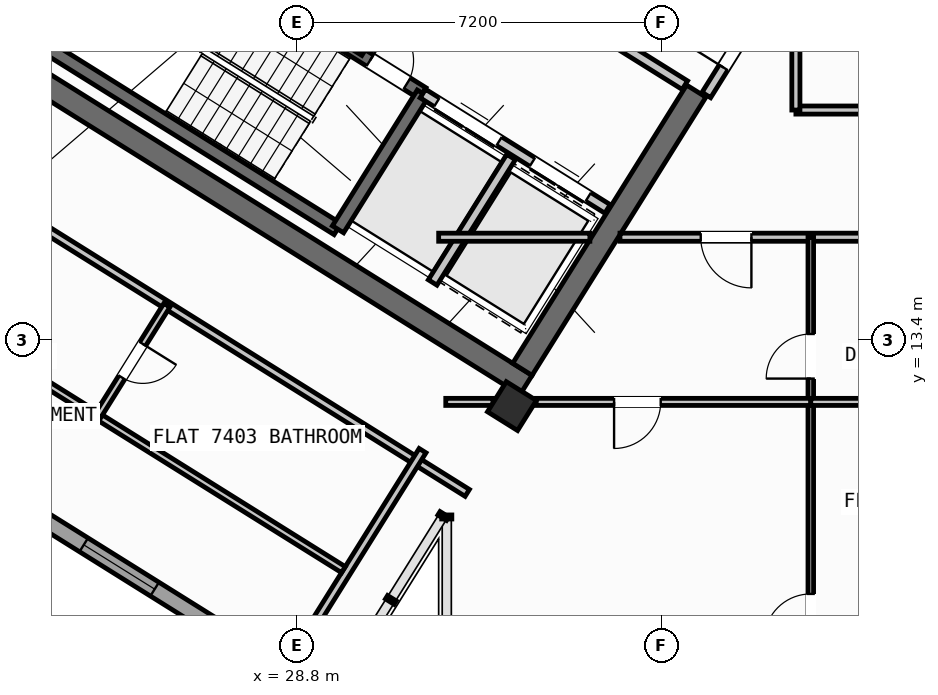
"""IFC4 building model, lengths in metres.
Left out: names, types, materials, properties, quantities, classifications, styles, units other than length and angle.
Written with IfcOpenShell. Run it as: python <this file> out.ifc"""

import sys

from ifc_helpers import new_model, si_unit, direction, frame, frame_2d, origin, origin_2d, place, context, subcontext, project, spatial, rectangle, hollow_rectangle, extrude, source, transform, mapped, element, fill, save


model = new_model("IFC4")
c1 = context("Model", 3, precision=1e-05, world=origin(), true_north=direction((0.0, 1.0)))
c2 = subcontext(c1, "Body", "Model", "MODEL_VIEW")
j1 = project(units=[si_unit("LENGTHUNIT", "METRE"), si_unit("PLANEANGLEUNIT", "RADIAN")], contexts=[c1])
p1 = place(None, origin())
s1 = spatial("IfcSite", under=j1, at=p1, CompositionType="ELEMENT")
p2 = place(p1, origin())
s2 = spatial("IfcBuilding", under=s1, at=p2, CompositionType="ELEMENT")
p3 = place(p2, frame((0.0, 0.0, 291.6)))
s3 = spatial("IfcBuildingStorey", under=s2, at=p3, CompositionType="ELEMENT", Elevation=291.6)
p4 = place(p3, frame((33.324, 12.503, 0.0), z_axis=(0.0, 0.0, 1.0), x_axis=(-0.848043529849, 0.529926571782, 0.0)))
e1 = element("IfcWall", 1, at=p4, inside=s3, PredefinedType="SHEAR", context=c2, shape_type="SweptSolid", body=[
    extrude(rectangle(XDim=13.04, YDim=0.45, at=frame_2d((6.52, 0.0))), origin(), (0.0, 0.0, 1.0), 3.35),
])
p5 = place(p3, frame((36.683, 18.304, 0.0), z_axis=(0.0, 0.0, 1.0), x_axis=(-0.529904039071, -0.848057609704, 0.0)))
e2 = element("IfcWall", 2, at=p5, inside=s3, PredefinedType="SHEAR", context=c2, shape_type="SweptSolid", body=[
    extrude(rectangle(XDim=6.475, YDim=0.45, at=frame_2d((3.238, 0.0))), origin(), (0.0, 0.0, 1.0), 3.35),
])
m1 = source(origin(), c2, "Body", "SweptSolid", [
    extrude(hollow_rectangle(XDim=0.7, YDim=0.7, WallThickness=0.028, at=origin_2d()), origin(), (0.0, 0.0, 1.0), 3.6),
])
p6 = place(p3, frame((33.046, 12.087, 0.0), z_axis=(0.0, 0.0, 1.0), x_axis=(-0.848048096156, 0.529919264233, 0.0)))
e3 = element("IfcColumn", 3, at=p6, inside=s3, PredefinedType="COLUMN", context=c2, shape_type="MappedRepresentation", body=[
    mapped(m1, transform((0.0, 0.0, 0.0), scale=1.0)),
])
p7 = place(p3, frame((29.268, 6.429, 0.0), z_axis=(0.0, 0.0, 1.0), x_axis=(-0.848048398186, 0.529918780885, 0.0)))
e4 = element("IfcWall", 4, at=p7, inside=s3, PredefinedType="STANDARD", context=c2, shape_type="SweptSolid", body=[
    extrude(rectangle(XDim=25.188, YDim=0.32, at=frame_2d((12.594, 0.0))), origin(), (0.0, 0.0, 1.0), 3.35),
])
p8 = place(p7, frame((16.362, 0.0, 0.0)))
e5 = element("IfcOpeningElement", 5, at=p8, cuts=e4, PredefinedType="OPENING", context=c2, shape_type="SweptSolid", body=[
    extrude(rectangle(XDim=1.2, YDim=2.15, at=frame_2d((0.6, 1.075))), frame((0.0, 0.17, 0.0), z_axis=(0.0, -1.0, 0.0), x_axis=(1.0, 0.0, 0.0)), (0.0, 0.0, 1.0), 0.34),
])
p9 = place(p7, frame((3.859, 0.0, 0.9)))
e6 = element("IfcOpeningElement", 6, at=p9, cuts=e4, PredefinedType="OPENING", context=c2, shape_type="SweptSolid", body=[
    extrude(rectangle(XDim=1.65, YDim=1.45, at=frame_2d((0.825, 0.725))), frame((0.0, 0.17, 0.0), z_axis=(0.0, -1.0, 0.0), x_axis=(1.0, 0.0, 0.0)), (0.0, 0.0, 1.0), 0.34),
])
p10 = place(p7, frame((10.519, 0.0, 0.9)))
e7 = element("IfcOpeningElement", 7, at=p10, cuts=e4, PredefinedType="OPENING", context=c2, shape_type="SweptSolid", body=[
    extrude(rectangle(XDim=1.65, YDim=1.45, at=frame_2d((0.825, 0.725))), frame((0.0, 0.17, 0.0), z_axis=(0.0, -1.0, 0.0), x_axis=(1.0, 0.0, 0.0)), (0.0, 0.0, 1.0), 0.34),
])
p11 = place(p7, frame((21.156, 0.0, 0.95)))
e8 = element("IfcOpeningElement", 8, at=p11, cuts=e4, PredefinedType="OPENING", context=c2, shape_type="SweptSolid", body=[
    extrude(rectangle(XDim=1.95, YDim=1.35, at=frame_2d((0.975, 0.675))), frame((0.0, 0.17, 0.0), z_axis=(0.0, -1.0, 0.0), x_axis=(1.0, 0.0, 0.0)), (0.0, 0.0, 1.0), 0.34),
])
p12 = place(p3, frame((29.605, 15.581, 0.0), z_axis=(0.0, 0.0, 1.0), x_axis=(-0.848036911448, 0.529937163087, 0.0)))
e9 = element("IfcWall", 9, at=p12, inside=s3, PredefinedType="SHEAR", context=c2, shape_type="SweptSolid", body=[
    extrude(rectangle(XDim=7.46, YDim=0.26, at=frame_2d((3.73, 0.0))), origin(), (0.0, 0.0, 1.0), 3.35),
])
p13 = place(p3, frame((31.28, 18.261, 0.0), z_axis=(0.0, 0.0, 1.0), x_axis=(-0.848051618787, 0.529913626805, 0.0)))
e10 = element("IfcWall", 10, at=p13, inside=s3, PredefinedType="SHEAR", context=c2, shape_type="SweptSolid", body=[
    extrude(rectangle(XDim=7.46, YDim=0.26, at=frame_2d((3.73, 0.0))), origin(), (0.0, 0.0, 1.0), 3.35),
])
p14 = place(p13, frame((0.36, 0.0, 0.0)))
e11 = element("IfcOpeningElement", 11, at=p14, cuts=e10, PredefinedType="OPENING", context=c2, shape_type="SweptSolid", body=[
    extrude(rectangle(XDim=0.86, YDim=2.05, at=frame_2d((0.43, 1.025))), frame((0.0, 0.14, 0.0), z_axis=(0.0, -1.0, 0.0), x_axis=(1.0, 0.0, 0.0)), (0.0, 0.0, 1.0), 0.28),
])
p15 = place(p3, frame((31.288, 18.256, 0.0), z_axis=(0.0, 0.0, 1.0), x_axis=(-0.529943379326, -0.848033026897, 0.0)))
e12 = element("IfcWall", 12, at=p15, inside=s3, PredefinedType="SHEAR", context=c2, shape_type="SweptSolid", body=[
    extrude(rectangle(XDim=3.16, YDim=0.26, at=frame_2d((1.58, 0.0))), origin(), (0.0, 0.0, 1.0), 3.35),
])
p16 = place(p3, frame((34.933, 15.978, 0.0), z_axis=(0.0, 0.0, 1.0), x_axis=(-0.848055739377, 0.529907032327, 0.0)))
e13 = element("IfcWall", 13, at=p16, inside=s3, PredefinedType="STANDARD", context=c2, shape_type="SweptSolid", body=[
    extrude(rectangle(XDim=4.298, YDim=0.2, at=frame_2d((2.149, 0.0))), origin(), (0.0, 0.0, 1.0), 3.34),
])
p17 = place(p16, frame((0.448, 0.0, 0.0)))
e14 = element("IfcOpeningElement", 14, at=p17, cuts=e13, PredefinedType="OPENING", context=c2, shape_type="SweptSolid", body=[
    extrude(rectangle(XDim=1.3, YDim=2.2, at=frame_2d((0.65, 1.1))), frame((0.0, 0.11, 0.0), z_axis=(0.0, -1.0, 0.0), x_axis=(1.0, 0.0, 0.0)), (0.0, 0.0, 1.0), 0.22),
])
p18 = place(p16, frame((2.523, 0.0, 0.0)))
e15 = element("IfcOpeningElement", 15, at=p18, cuts=e13, PredefinedType="OPENING", context=c2, shape_type="SweptSolid", body=[
    extrude(rectangle(XDim=1.45, YDim=2.25, at=frame_2d((0.725, 1.125))), frame((0.0, 0.11, 0.0), z_axis=(0.0, -1.0, 0.0), x_axis=(1.0, 0.0, 0.0)), (0.0, 0.0, 1.0), 0.22),
])
p19 = place(p3, frame((36.459, 18.421, 0.0), z_axis=(0.0, 0.0, 1.0), x_axis=(-0.848059591691, 0.529900867089, 0.0)))
e16 = element("IfcWall", 16, at=p19, inside=s3, PredefinedType="STANDARD", context=c2, shape_type="SweptSolid", body=[
    extrude(rectangle(XDim=5.818, YDim=0.2, at=frame_2d((2.909, 0.0))), origin(), (0.0, 0.0, 1.0), 3.34),
])
p20 = place(p19, frame((2.598, 0.0, 0.0)))
e17 = element("IfcOpeningElement", 17, at=p20, cuts=e16, PredefinedType="OPENING", context=c2, shape_type="SweptSolid", body=[
    extrude(rectangle(XDim=1.15, YDim=2.1, at=frame_2d((0.575, 1.05))), frame((0.0, 0.11, 0.0), z_axis=(0.0, -1.0, 0.0), x_axis=(1.0, 0.0, 0.0)), (0.0, 0.0, 1.0), 0.22),
])
p21 = place(p3, frame((33.029, 17.003, 0.0), z_axis=(0.0, 0.0, 1.0), x_axis=(-0.529916267533, -0.848049968695, 0.0)))
e18 = element("IfcWall", 18, at=p21, inside=s3, PredefinedType="STANDARD", context=c2, shape_type="SweptSolid", body=[
    extrude(rectangle(XDim=2.92, YDim=0.2, at=frame_2d((1.46, 0.0))), origin(), (0.0, 0.0, 1.0), 3.34),
])
p22 = place(p3, frame((31.525, 21.504, 0.0), z_axis=(0.0, 0.0, 1.0), x_axis=(-0.529907497854, -0.848055448493, 0.0)))
e19 = element("IfcWall", 19, at=p22, inside=s3, PredefinedType="STANDARD", context=c2, shape_type="SweptSolid", body=[
    extrude(rectangle(XDim=2.88, YDim=0.2, at=frame_2d((1.44, 0.0))), origin(), (0.0, 0.0, 1.0), 3.34),
])
p23 = place(p3, frame((32.164, 10.374, 0.0), z_axis=(0.0, 0.0, 1.0), x_axis=(-0.848044107957, 0.529925646633, 0.0)))
e20 = element("IfcWall", 20, at=p23, inside=s3, PredefinedType="PARTITIONING", context=c2, shape_type="SweptSolid", body=[
    extrude(rectangle(XDim=15.57, YDim=0.16, at=frame_2d((7.785, 0.0))), origin(), (0.0, 0.0, 1.0), 3.34),
])
p24 = place(p23, frame((10.83, 0.0, 0.0)))
e21 = element("IfcOpeningElement", 21, at=p24, cuts=e20, PredefinedType="OPENING", context=c2, shape_type="SweptSolid", body=[
    extrude(rectangle(XDim=1.0, YDim=2.1, at=frame_2d((0.5, 1.05))), frame((0.0, 0.09, 0.0), z_axis=(0.0, -1.0, 0.0), x_axis=(1.0, 0.0, 0.0)), (0.0, 0.0, 1.0), 0.18),
])
p25 = place(p3, frame((31.282, 11.208, 0.0), z_axis=(0.0, 0.0, 1.0), x_axis=(-0.529938869374, -0.84803584519, 0.0)))
e22 = element("IfcWall", 22, at=p25, inside=s3, PredefinedType="PARTITIONING", context=c2, shape_type="SweptSolid", body=[
    extrude(rectangle(XDim=5.48, YDim=0.16, at=frame_2d((2.74, 0.0))), origin(), (0.0, 0.0, 1.0), 3.34),
])
p26 = place(p3, frame((29.72, 8.859, 0.0), z_axis=(0.0, 0.0, 1.0), x_axis=(-0.848049134363, 0.529917602752, 0.0)))
e23 = element("IfcWall", 23, at=p26, inside=s3, PredefinedType="PLUMBINGWALL", context=c2, shape_type="SweptSolid", body=[
    extrude(rectangle(XDim=14.3, YDim=0.14, at=frame_2d((7.15, 0.0))), origin(), (0.0, 0.0, 1.0), 3.34),
])
p27 = place(p26, frame((9.57, 0.0, 0.0)))
e24 = element("IfcOpeningElement", 24, at=p27, cuts=e23, PredefinedType="OPENING", context=c2, shape_type="SweptSolid", body=[
    extrude(rectangle(XDim=0.92, YDim=2.08, at=frame_2d((0.46, 1.04))), frame((0.0, 0.08, 0.0), z_axis=(0.0, -1.0, 0.0), x_axis=(1.0, 0.0, 0.0)), (0.0, 0.0, 1.0), 0.16),
])
p28 = place(p3, frame((26.237, 14.078, 0.0), z_axis=(0.0, 0.0, 1.0), x_axis=(-0.52995640672, -0.848024885824, 0.0)))
e25 = element("IfcWall", 25, at=p28, inside=s3, PredefinedType="PLUMBINGWALL", context=c2, shape_type="SweptSolid", body=[
    extrude(rectangle(XDim=2.58, YDim=0.14, at=frame_2d((1.29, 0.0))), origin(), (0.0, 0.0, 1.0), 3.34),
])
p29 = place(p28, frame((0.9, 0.0, 0.0)))
e26 = element("IfcOpeningElement", 26, at=p29, cuts=e25, PredefinedType="OPENING", context=c2, shape_type="SweptSolid", body=[
    extrude(rectangle(XDim=0.78, YDim=2.05, at=frame_2d((0.39, 1.025))), frame((0.0, 0.08, 0.0), z_axis=(0.0, -1.0, 0.0), x_axis=(1.0, 0.0, 0.0)), (0.0, 0.0, 1.0), 0.16),
])
p30 = place(p3, frame((38.451, 20.737, 0.0), z_axis=(0.0, 0.0, 1.0), x_axis=(-0.529924799939, -0.848044637038, 0.0)))
e27 = element("IfcWall", 27, at=p30, inside=s3, PredefinedType="STANDARD", context=c2, shape_type="SweptSolid", body=[
    extrude(rectangle(XDim=2.96, YDim=0.2, at=frame_2d((1.48, 0.0))), origin(), (0.0, 0.0, 1.0), 3.34),
])
p31 = place(p30, frame((1.46, 0.0, 0.0)))
e28 = element("IfcOpeningElement", 28, at=p31, cuts=e27, PredefinedType="OPENING", context=c2, shape_type="SweptSolid", body=[
    extrude(rectangle(XDim=0.86, YDim=2.05, at=frame_2d((0.43, 1.025))), frame((0.0, 0.11, 0.0), z_axis=(0.0, -1.0, 0.0), x_axis=(1.0, 0.0, 0.0)), (0.0, 0.0, 1.0), 0.22),
])
p32 = place(p3, frame((31.6, 15.42, 0.0), z_axis=(0.0, 0.0, 1.0), x_axis=(1.0, 0.0, 0.0)))
e29 = element("IfcWall", 29, at=p32, inside=s3, PredefinedType="PARTITIONING", context=c2, shape_type="SweptSolid", body=[
    extrude(rectangle(XDim=2.984, YDim=0.16, at=frame_2d((1.492, 0.0))), origin(), (0.0, 0.0, 1.0), 3.34),
])
p33 = place(p3, frame((35.178, 15.42, 0.0), z_axis=(0.0, 0.0, 1.0), x_axis=(1.0, 0.0, 0.0)))
e30 = element("IfcWall", 30, at=p33, inside=s3, PredefinedType="PARTITIONING", context=c2, shape_type="SweptSolid", body=[
    extrude(rectangle(XDim=9.021, YDim=0.16, at=frame_2d((4.511, 0.0))), origin(), (0.0, 0.0, 1.0), 3.34),
])
p34 = place(p33, frame((1.594, 0.0, 0.0)))
e31 = element("IfcOpeningElement", 31, at=p34, cuts=e30, PredefinedType="OPENING", context=c2, shape_type="SweptSolid", body=[
    extrude(rectangle(XDim=1.0, YDim=2.1, at=frame_2d((0.5, 1.05))), frame((0.0, 0.09, 0.0), z_axis=(0.0, -1.0, 0.0), x_axis=(1.0, 0.0, 0.0)), (0.0, 0.0, 1.0), 0.18),
])
p35 = place(p3, frame((38.65, 17.93, 0.0), z_axis=(0.0, 0.0, 1.0), x_axis=(1.0, 0.0, 0.0)))
e32 = element("IfcWall", 32, at=p35, inside=s3, PredefinedType="PARTITIONING", context=c2, shape_type="SweptSolid", body=[
    extrude(rectangle(XDim=4.15, YDim=0.16, at=frame_2d((2.075, 0.0))), origin(), (0.0, 0.0, 1.0), 3.34),
])
p36 = place(p35, frame((1.575, 0.0, 0.0)))
e33 = element("IfcOpeningElement", 33, at=p36, cuts=e32, PredefinedType="OPENING", context=c2, shape_type="SweptSolid", body=[
    extrude(rectangle(XDim=1.0, YDim=2.1, at=frame_2d((0.5, 1.05))), frame((0.0, 0.09, 0.0), z_axis=(0.0, -1.0, 0.0), x_axis=(1.0, 0.0, 0.0)), (0.0, 0.0, 1.0), 0.18),
])
p37 = place(p3, frame((38.65, 17.93, 0.0), z_axis=(0.0, 0.0, 1.0), x_axis=(0.0, 1.0, 0.0)))
e34 = element("IfcWall", 34, at=p37, inside=s3, PredefinedType="PARTITIONING", context=c2, shape_type="SweptSolid", body=[
    extrude(rectangle(XDim=3.046, YDim=0.16, at=frame_2d((1.523, 0.0))), origin(), (0.0, 0.0, 1.0), 3.34),
])
p38 = place(p3, frame((38.944, 1.96, 0.0), z_axis=(0.0, 0.0, 1.0), x_axis=(0.0, 1.0, 0.0)))
e35 = element("IfcWall", 35, at=p38, inside=s3, PredefinedType="PARTITIONING", context=c2, shape_type="SweptSolid", body=[
    extrude(rectangle(XDim=13.46, YDim=0.11, at=frame_2d((6.73, 0.0))), origin(), (0.0, 0.0, 1.0), 3.34),
])
p39 = place(p38, frame((5.5, 0.0, 0.0)))
e36 = element("IfcOpeningElement", 36, at=p39, cuts=e35, PredefinedType="OPENING", context=c2, shape_type="SweptSolid", body=[
    extrude(rectangle(XDim=0.92, YDim=2.08, at=frame_2d((0.46, 1.04))), frame((0.0, 0.065, 0.0), z_axis=(0.0, -1.0, 0.0), x_axis=(1.0, 0.0, 0.0)), (0.0, 0.0, 1.0), 0.13),
])
p40 = place(p38, frame((10.67, 0.0, 0.0)))
e37 = element("IfcOpeningElement", 37, at=p40, cuts=e35, PredefinedType="OPENING", context=c2, shape_type="SweptSolid", body=[
    extrude(rectangle(XDim=0.88, YDim=2.08, at=frame_2d((0.44, 1.04))), frame((0.0, 0.065, 0.0), z_axis=(0.0, -1.0, 0.0), x_axis=(1.0, 0.0, 0.0)), (0.0, 0.0, 1.0), 0.13),
])
p41 = place(p3, frame((31.74, 12.17, 0.0), z_axis=(0.0, 0.0, 1.0), x_axis=(1.0, 0.0, 0.0)))
e38 = element("IfcWall", 38, at=p41, inside=s3, PredefinedType="PLUMBINGWALL", context=c2, shape_type="SweptSolid", body=[
    extrude(rectangle(XDim=0.931, YDim=0.14, at=frame_2d((0.466, 0.0))), origin(), (0.0, 0.0, 1.0), 3.34),
])
p42 = place(p3, frame((33.525, 12.17, 0.0), z_axis=(0.0, 0.0, 1.0), x_axis=(1.0, 0.0, 0.0)))
e39 = element("IfcWall", 39, at=p42, inside=s3, PredefinedType="PLUMBINGWALL", context=c2, shape_type="SweptSolid", body=[
    extrude(rectangle(XDim=5.419, YDim=0.14, at=frame_2d((2.709, 0.0))), origin(), (0.0, 0.0, 1.0), 3.34),
])
p43 = place(p42, frame((1.537, 0.0, 0.0)))
e40 = element("IfcOpeningElement", 40, at=p43, cuts=e39, PredefinedType="OPENING", context=c2, shape_type="SweptSolid", body=[
    extrude(rectangle(XDim=0.92, YDim=2.08, at=frame_2d((0.46, 1.04))), frame((0.0, 0.08, 0.0), z_axis=(0.0, -1.0, 0.0), x_axis=(1.0, 0.0, 0.0)), (0.0, 0.0, 1.0), 0.16),
])
p44 = place(p3, frame((38.944, 12.17, 0.0), z_axis=(0.0, 0.0, 1.0), x_axis=(1.0, 0.0, 0.0)))
e41 = element("IfcWall", 41, at=p44, inside=s3, PredefinedType="PLUMBINGWALL", context=c2, shape_type="SweptSolid", body=[
    extrude(rectangle(XDim=5.116, YDim=0.14, at=frame_2d((2.558, 0.0))), origin(), (0.0, 0.0, 1.0), 3.34),
])
m2 = source(origin(), c2, "Body", "SweptSolid", [
    extrude(rectangle(XDim=1.65, YDim=1.45, at=frame_2d((0.825, 0.725))), frame((0.0, 0.03, 0.0), z_axis=(0.0, -1.0, 0.0), x_axis=(1.0, 0.0, 0.0)), (0.0, 0.0, 1.0), 0.06),
])
p45 = place(p9, origin())
e42 = element("IfcWindow", 42, at=p45, inside=s3, PartitioningType="SINGLE_PANEL", PredefinedType="WINDOW", context=c2, shape_type="MappedRepresentation", body=[
    mapped(m2, transform((0.0, 0.0, 0.0), scale=1.0)),
])
fill(e6, e42)
m3 = source(origin(), c2, "Body", "SweptSolid", [
    extrude(rectangle(XDim=0.86, YDim=2.05, at=frame_2d((0.43, 1.025))), frame((0.0, 0.025, 0.0), z_axis=(0.0, -1.0, 0.0), x_axis=(1.0, 0.0, 0.0)), (0.0, 0.0, 1.0), 0.05),
])
p46 = place(p14, frame((0.86, 0.0, 0.0), z_axis=(0.0, 0.0, 1.0), x_axis=(-1.0, 0.0, 0.0)))
e43 = element("IfcDoor", 43, at=p46, inside=s3, OperationType="SINGLE_SWING_LEFT", PredefinedType="DOOR", context=c2, shape_type="MappedRepresentation", body=[
    mapped(m3, transform((0.0, 0.0, 0.0), scale=1.0)),
])
fill(e11, e43)
m4 = source(origin(), c2, "Body", "SweptSolid", [
    extrude(rectangle(XDim=1.3, YDim=2.2, at=frame_2d((0.65, 1.1))), frame((0.0, 0.025, 0.0), z_axis=(0.0, -1.0, 0.0), x_axis=(1.0, 0.0, 0.0)), (0.0, 0.0, 1.0), 0.05),
])
p47 = place(p17, origin())
e44 = element("IfcDoor", 44, at=p47, inside=s3, OperationType="DOUBLE_DOOR_SLIDING", PredefinedType="DOOR", context=c2, shape_type="MappedRepresentation", body=[
    mapped(m4, transform((0.0, 0.0, 0.0), scale=1.0)),
])
fill(e14, e44)
m5 = source(origin(), c2, "Body", "SweptSolid", [
    extrude(rectangle(XDim=1.45, YDim=2.25, at=frame_2d((0.725, 1.125))), frame((0.0, 0.025, 0.0), z_axis=(0.0, -1.0, 0.0), x_axis=(1.0, 0.0, 0.0)), (0.0, 0.0, 1.0), 0.05),
])
p48 = place(p18, origin())
e45 = element("IfcDoor", 45, at=p48, inside=s3, OperationType="DOUBLE_DOOR_SLIDING", PredefinedType="DOOR", context=c2, shape_type="MappedRepresentation", body=[
    mapped(m5, transform((0.0, 0.0, 0.0), scale=1.0)),
])
fill(e15, e45)
m6 = source(origin(), c2, "Body", "SweptSolid", [
    extrude(rectangle(XDim=0.78, YDim=2.05, at=frame_2d((0.39, 1.025))), frame((0.0, 0.025, 0.0), z_axis=(0.0, -1.0, 0.0), x_axis=(1.0, 0.0, 0.0)), (0.0, 0.0, 1.0), 0.05),
])
p49 = place(p29, origin())
e46 = element("IfcDoor", 46, at=p49, inside=s3, OperationType="SINGLE_SWING_LEFT", PredefinedType="DOOR", context=c2, shape_type="MappedRepresentation", body=[
    mapped(m6, transform((0.0, 0.0, 0.0), scale=1.0)),
])
fill(e26, e46)
p50 = place(p31, frame((0.86, 0.0, 0.0), z_axis=(0.0, 0.0, 1.0), x_axis=(-1.0, 0.0, 0.0)))
e47 = element("IfcDoor", 47, at=p50, inside=s3, OperationType="SINGLE_SWING_LEFT", PredefinedType="DOOR", context=c2, shape_type="MappedRepresentation", body=[
    mapped(m3, transform((0.0, 0.0, 0.0), scale=1.0)),
])
fill(e28, e47)
m7 = source(origin(), c2, "Body", "SweptSolid", [
    extrude(rectangle(XDim=0.92, YDim=2.08, at=frame_2d((0.46, 1.04))), frame((0.0, 0.025, 0.0), z_axis=(0.0, -1.0, 0.0), x_axis=(1.0, 0.0, 0.0)), (0.0, 0.0, 1.0), 0.05),
])
p51 = place(p39, origin())
e48 = element("IfcDoor", 48, at=p51, inside=s3, OperationType="SINGLE_SWING_LEFT", PredefinedType="DOOR", context=c2, shape_type="MappedRepresentation", body=[
    mapped(m7, transform((0.0, 0.0, 0.0), scale=1.0)),
])
fill(e36, e48)
m8 = source(origin(), c2, "Body", "SweptSolid", [
    extrude(rectangle(XDim=1.0, YDim=2.1, at=frame_2d((0.5, 1.05))), frame((0.0, 0.025, 0.0), z_axis=(0.0, -1.0, 0.0), x_axis=(1.0, 0.0, 0.0)), (0.0, 0.0, 1.0), 0.05),
])
p52 = place(p34, frame((1.0, 0.0, 0.0), z_axis=(0.0, 0.0, 1.0), x_axis=(-1.0, 0.0, 0.0)))
e49 = element("IfcDoor", 49, at=p52, inside=s3, OperationType="SINGLE_SWING_LEFT", PredefinedType="DOOR", context=c2, shape_type="MappedRepresentation", body=[
    mapped(m8, transform((0.0, 0.0, 0.0), scale=1.0)),
])
fill(e31, e49)
p53 = place(p43, frame((0.92, 0.0, 0.0), z_axis=(0.0, 0.0, 1.0), x_axis=(-1.0, 0.0, 0.0)))
e50 = element("IfcDoor", 50, at=p53, inside=s3, OperationType="SINGLE_SWING_RIGHT", PredefinedType="DOOR", context=c2, shape_type="MappedRepresentation", body=[
    mapped(m7, transform((0.0, 0.0, 0.0), scale=1.0)),
])
fill(e40, e50)
m9 = source(origin(), c2, "Body", "SweptSolid", [
    extrude(rectangle(XDim=0.88, YDim=2.08, at=frame_2d((0.44, 1.04))), frame((0.0, 0.025, 0.0), z_axis=(0.0, -1.0, 0.0), x_axis=(1.0, 0.0, 0.0)), (0.0, 0.0, 1.0), 0.05),
])
p54 = place(p40, origin())
e51 = element("IfcDoor", 51, at=p54, inside=s3, OperationType="SINGLE_SWING_LEFT", PredefinedType="DOOR", context=c2, shape_type="MappedRepresentation", body=[
    mapped(m9, transform((0.0, 0.0, 0.0), scale=1.0)),
])
fill(e37, e51)
save(model, sys.argv[1])
